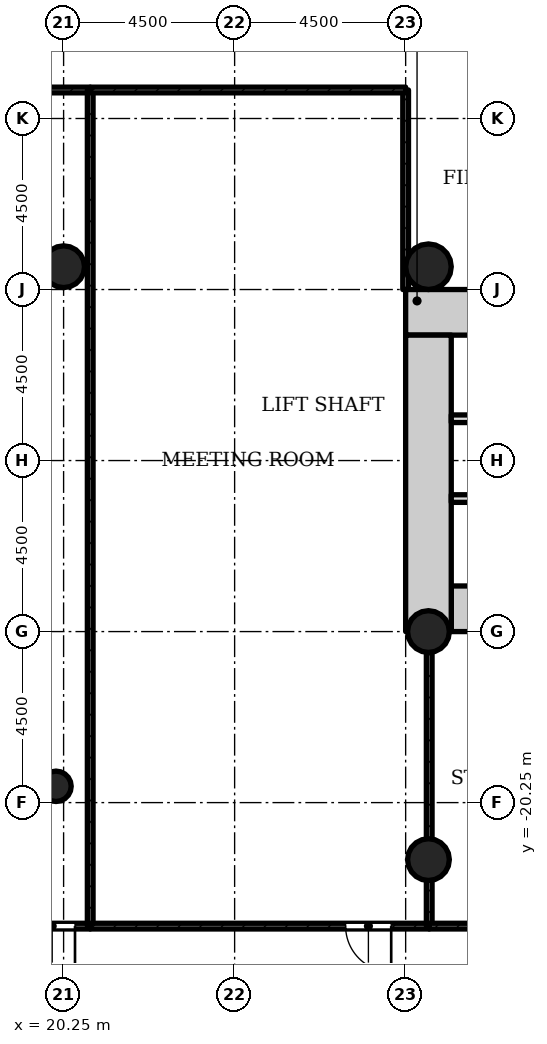
"""IFC4 building model, lengths in metres.
Left out: names, types, materials, properties, quantities, classifications, styles, units other than length and angle.
Written with IfcOpenShell. Run it as: python <this file> out.ifc"""

import sys

from ifc_helpers import new_model, si_unit, direction, frame, frame_2d, origin, origin_2d, place, context, subcontext, project, spatial, rectangle, hollow_circle, extrude, element, fill, save


model = new_model("IFC4")
c1 = context("Model", 3, precision=1e-05, world=origin(), true_north=direction((0.0, 1.0)))
c2 = subcontext(c1, "Body", "Model", "MODEL_VIEW")
j1 = project(units=[si_unit("LENGTHUNIT", "METRE"), si_unit("PLANEANGLEUNIT", "RADIAN")], contexts=[c1])
p1 = place(None, origin())
s1 = spatial("IfcSite", under=j1, at=p1, CompositionType="ELEMENT")
p2 = place(p1, origin())
s2 = spatial("IfcBuilding", under=s1, at=p2, CompositionType="ELEMENT")
p3 = place(p2, frame((0.0, 0.0, 11.0)))
s3 = spatial("IfcBuildingStorey", under=s2, at=p3, CompositionType="ELEMENT", Elevation=11.0)
p4 = place(p3, frame((30.45, -15.15, 0.0), z_axis=(0.0, 0.0, 1.0), x_axis=(1.0, 0.0, 0.0)))
e1 = element("IfcWall", 1, at=p4, inside=s3, PredefinedType="SHEAR", context=c2, shape_type="SweptSolid", body=[
    extrude(rectangle(XDim=12.3, YDim=1.2, at=frame_2d((6.15, 0.0))), origin(), (0.0, 0.0, 1.0), 4.5),
])
p5 = place(p4, frame((4.65, 0.0, 0.0)))
e2 = element("IfcOpeningElement", 2, at=p5, cuts=e1, PredefinedType="OPENING", context=c2, shape_type="SweptSolid", body=[
    extrude(rectangle(XDim=1.8, YDim=2.1, at=frame_2d((0.9, 1.05))), frame((0.0, 0.61, 0.0), z_axis=(0.0, -1.0, 0.0), x_axis=(1.0, 0.0, 0.0)), (0.0, 0.0, 1.0), 1.22),
])
p6 = place(p3, frame((41.55, -7.35, 0.0), z_axis=(0.0, 0.0, 1.0), x_axis=(-1.0, 0.0, 0.0)))
e3 = element("IfcWall", 3, at=p6, inside=s3, PredefinedType="SHEAR", context=c2, shape_type="SweptSolid", body=[
    extrude(rectangle(XDim=12.3, YDim=1.2, at=frame_2d((6.15, 0.0))), origin(), (0.0, 0.0, 1.0), 4.5),
])
p7 = place(p6, frame((4.65, 0.0, 0.0)))
e4 = element("IfcOpeningElement", 4, at=p7, cuts=e3, PredefinedType="OPENING", context=c2, shape_type="SweptSolid", body=[
    extrude(rectangle(XDim=1.8, YDim=2.1, at=frame_2d((0.9, 1.05))), frame((0.0, 0.61, 0.0), z_axis=(0.0, -1.0, 0.0), x_axis=(1.0, 0.0, 0.0)), (0.0, 0.0, 1.0), 1.22),
])
p8 = place(p3, frame((29.85, -7.95, 0.0), z_axis=(0.0, 0.0, 1.0), x_axis=(0.0, -1.0, 0.0)))
e5 = element("IfcWall", 5, at=p8, inside=s3, PredefinedType="SHEAR", context=c2, shape_type="SweptSolid", body=[
    extrude(rectangle(XDim=7.8, YDim=1.2, at=frame_2d((3.9, 0.0))), origin(), (0.0, 0.0, 1.0), 4.5),
])
for number, where, z_axis, x_axis in (
    (6, (20.25, -6.15, 0.0), (0.0, 0.0, 1.0), (1.0, 0.0, 0.0)),
    (7, (29.85, -15.75, 0.0), (0.0, 0.0, 1.0), (1.0, 0.0, 0.0)),
    (8, (29.85, -21.75, 0.0), (0.0, 0.0, 1.0), (1.0, 0.0, 0.0)),
):
    element("IfcColumn", number, at=place(p3, frame(where, z_axis=z_axis, x_axis=x_axis)), inside=s3, PredefinedType="COLUMN", context=c2, shape_type="SweptSolid", body=[
        extrude(hollow_circle(Radius=0.55, WallThickness=0.04, at=origin_2d()), origin(), (0.0, 0.0, 1.0), 4.5),
    ])
p9 = place(p3, frame((29.85, -6.15, 0.0), z_axis=(0.0, 0.0, 1.0), x_axis=(1.0, 0.0, 0.0)))
e9 = element("IfcColumn", 9, at=p9, inside=s3, PredefinedType="COLUMN", context=c2, shape_type="SweptSolid", body=[
    extrude(hollow_circle(Radius=0.6, WallThickness=0.045, at=origin_2d()), origin(), (0.0, 0.0, 1.0), 4.5),
])
p10 = place(p3, frame((20.05, -19.821, 0.0), z_axis=(0.0, 0.0, 1.0), x_axis=(1.0, 0.0, 0.0)))
e10 = element("IfcColumn", 10, at=p10, inside=s3, PredefinedType="COLUMN", context=c2, shape_type="SweptSolid", body=[
    extrude(hollow_circle(Radius=0.4, WallThickness=0.028, at=origin_2d()), origin(), (0.0, 0.0, 1.0), 4.5),
])
for number, where, z_axis, x_axis in (
    (11, (30.45, -10.15, 0.0), (0.0, 0.0, 1.0), (1.0, 0.0, 0.0)),
    (12, (30.45, -12.25, 0.0), (0.0, 0.0, 1.0), (1.0, 0.0, 0.0)),
):
    element("IfcWall", number, at=place(p3, frame(where, z_axis=z_axis, x_axis=x_axis)), inside=s3, PredefinedType="SOLIDWALL", context=c2, shape_type="SweptSolid", body=[
        extrude(rectangle(XDim=3.65, YDim=0.2, at=frame_2d((1.825, 0.0))), origin(), (0.0, 0.0, 1.0), 4.08),
    ])
p11 = place(p3, frame((20.95, -23.5, 0.0), z_axis=(0.0, 0.0, 1.0), x_axis=(-1.0, 0.0, 0.0)))
e13 = element("IfcWall", 13, at=p11, inside=s3, PredefinedType="PARTITIONING", context=c2, shape_type="SweptSolid", body=[
    extrude(rectangle(XDim=8.92, YDim=0.15, at=frame_2d((4.46, 0.0))), origin(), (0.0, 0.0, 1.0), 4.08),
])
p12 = place(p11, frame((0.4, 0.0, 0.0)))
e14 = element("IfcOpeningElement", 14, at=p12, cuts=e13, PredefinedType="OPENING", context=c2, shape_type="SweptSolid", body=[
    extrude(rectangle(XDim=1.2, YDim=2.1, at=frame_2d((0.6, 1.05))), frame((0.0, 0.085, 0.0), z_axis=(0.0, -1.0, 0.0), x_axis=(1.0, 0.0, 0.0)), (0.0, 0.0, 1.0), 0.17),
])
p13 = place(p3, frame((12.03, -1.5, 0.0), z_axis=(0.0, 0.0, 1.0), x_axis=(1.0, 0.0, 0.0)))
e15 = element("IfcWall", 15, at=p13, inside=s3, PredefinedType="PARTITIONING", context=c2, shape_type="SweptSolid", body=[
    extrude(rectangle(XDim=8.92, YDim=0.15, at=frame_2d((4.46, 0.0))), origin(), (0.0, 0.0, 1.0), 4.08),
])
p14 = place(p3, frame((20.95, -1.5, 0.0), z_axis=(0.0, 0.0, 1.0), x_axis=(0.0, -1.0, 0.0)))
e16 = element("IfcWall", 16, at=p14, inside=s3, PredefinedType="PARTITIONING", context=c2, shape_type="SweptSolid", body=[
    extrude(rectangle(XDim=22.0, YDim=0.15, at=frame_2d((11.0, 0.0))), origin(), (0.0, 0.0, 1.0), 4.08),
])
p15 = place(p3, frame((29.25, -1.5, 0.0), z_axis=(0.0, 0.0, 1.0), x_axis=(0.0, -1.0, 0.0)))
e17 = element("IfcWall", 17, at=p15, inside=s3, PredefinedType="PARTITIONING", context=c2, shape_type="SweptSolid", body=[
    extrude(rectangle(XDim=5.25, YDim=0.15, at=frame_2d((2.625, 0.0))), origin(), (0.0, 0.0, 1.0), 4.08),
])
p16 = place(p3, frame((29.87, -23.5, 0.0), z_axis=(0.0, 0.0, 1.0), x_axis=(-1.0, 0.0, 0.0)))
e18 = element("IfcWall", 18, at=p16, inside=s3, PredefinedType="PARTITIONING", context=c2, shape_type="SweptSolid", body=[
    extrude(rectangle(XDim=8.92, YDim=0.15, at=frame_2d((4.46, 0.0))), origin(), (0.0, 0.0, 1.0), 4.08),
])
p17 = place(p16, frame((1.0, 0.0, 0.0)))
e19 = element("IfcOpeningElement", 19, at=p17, cuts=e18, PredefinedType="OPENING", context=c2, shape_type="SweptSolid", body=[
    extrude(rectangle(XDim=1.2, YDim=2.1, at=frame_2d((0.6, 1.05))), frame((0.0, 0.085, 0.0), z_axis=(0.0, -1.0, 0.0), x_axis=(1.0, 0.0, 0.0)), (0.0, 0.0, 1.0), 0.17),
])
p18 = place(p3, frame((20.95, -1.5, 0.0), z_axis=(0.0, 0.0, 1.0), x_axis=(1.0, 0.0, 0.0)))
e20 = element("IfcWall", 20, at=p18, inside=s3, PredefinedType="PARTITIONING", context=c2, shape_type="SweptSolid", body=[
    extrude(rectangle(XDim=8.3, YDim=0.15, at=frame_2d((4.15, 0.0))), origin(), (0.0, 0.0, 1.0), 4.08),
])
p19 = place(p3, frame((29.87, -15.75, 0.0), z_axis=(0.0, 0.0, 1.0), x_axis=(0.0, -1.0, 0.0)))
e21 = element("IfcWall", 21, at=p19, inside=s3, PredefinedType="PARTITIONING", context=c2, shape_type="SweptSolid", body=[
    extrude(rectangle(XDim=7.75, YDim=0.15, at=frame_2d((3.875, 0.0))), origin(), (0.0, 0.0, 1.0), 4.08),
])
p20 = place(p3, frame((34.5, -23.5, 0.0), z_axis=(0.0, 0.0, 1.0), x_axis=(-1.0, 0.0, 0.0)))
e22 = element("IfcWall", 22, at=p20, inside=s3, PredefinedType="PARTITIONING", context=c2, shape_type="SweptSolid", body=[
    extrude(rectangle(XDim=4.63, YDim=0.15, at=frame_2d((2.315, 0.0))), origin(), (0.0, 0.0, 1.0), 4.08),
])
p21 = place(p12, origin())
e23 = element("IfcDoor", 23, at=p21, inside=s3, OperationType="SINGLE_SWING_RIGHT", PredefinedType="DOOR", context=c2, shape_type="SweptSolid", body=[
    extrude(rectangle(XDim=1.2, YDim=2.1, at=frame_2d((0.6, 1.05))), frame((0.0, 0.025, 0.0), z_axis=(0.0, -1.0, 0.0), x_axis=(1.0, 0.0, 0.0)), (0.0, 0.0, 1.0), 0.05),
])
fill(e14, e23)
p22 = place(p17, origin())
e24 = element("IfcDoor", 24, at=p22, inside=s3, OperationType="SINGLE_SWING_RIGHT", PredefinedType="DOOR", context=c2, shape_type="SweptSolid", body=[
    extrude(rectangle(XDim=1.2, YDim=2.1, at=frame_2d((0.6, 1.05))), frame((0.0, 0.025, 0.0), z_axis=(0.0, -1.0, 0.0), x_axis=(1.0, 0.0, 0.0)), (0.0, 0.0, 1.0), 0.05),
])
fill(e19, e24)
save(model, sys.argv[1])
